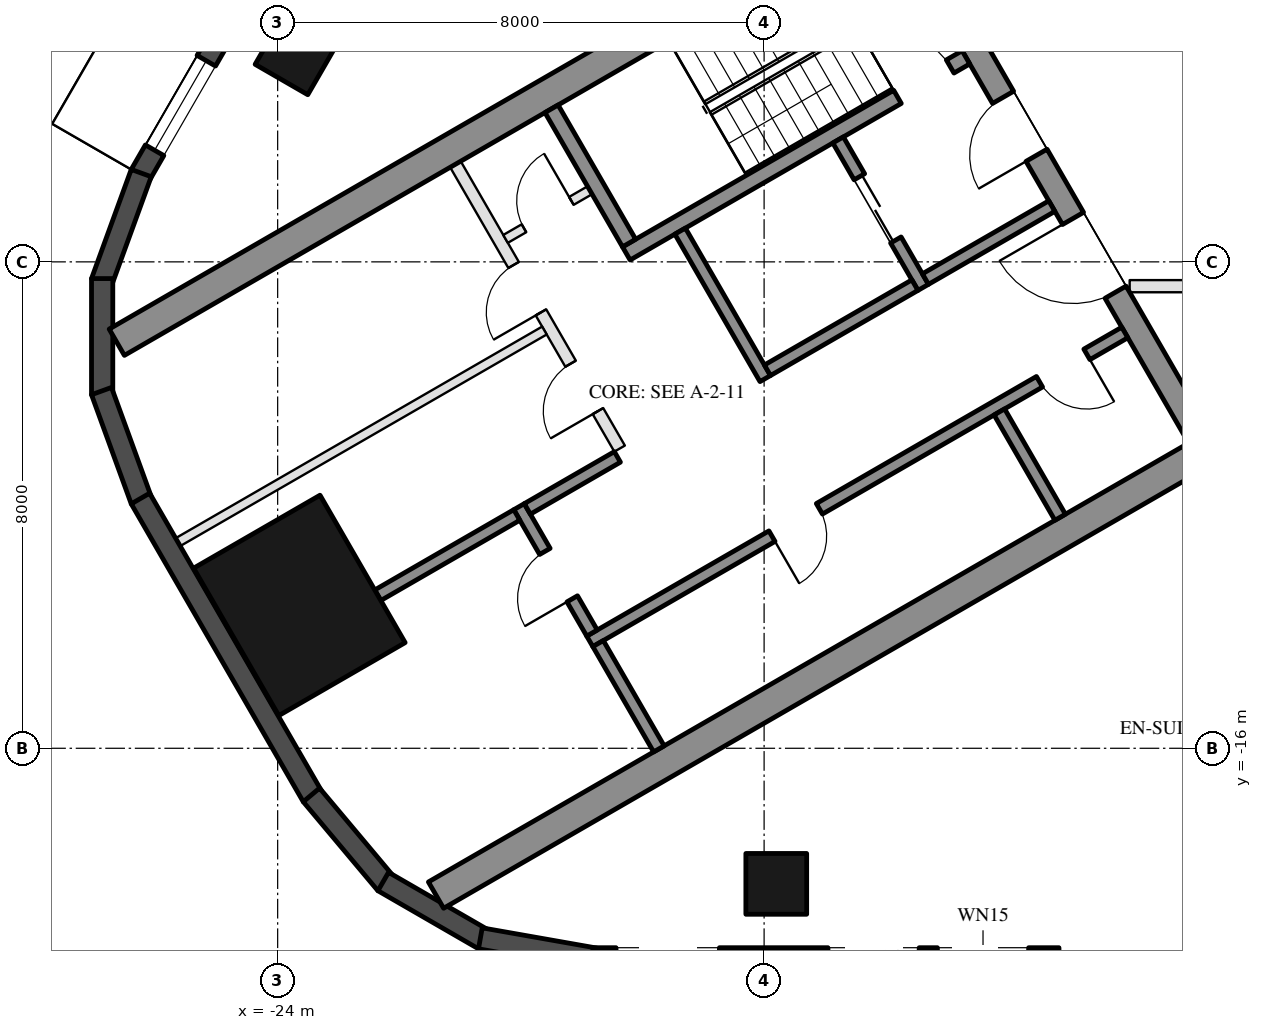
"""IFC4 building model, lengths in metres.
Left out: names, types, materials, properties, quantities, classifications, styles, units other than length and angle.
Written with IfcOpenShell. Run it as: python <this file> out.ifc"""

import sys

from ifc_helpers import new_model, si_unit, direction, frame, frame_2d, origin, origin_2d, place, context, subcontext, project, spatial, rectangle, hollow_rectangle, extrude, element, fill, save


model = new_model("IFC4")
c1 = context("Model", 3, precision=1e-05, world=origin(), true_north=direction((0.0, 1.0)))
c2 = subcontext(c1, "Body", "Model", "MODEL_VIEW")
j1 = project(units=[si_unit("LENGTHUNIT", "METRE"), si_unit("PLANEANGLEUNIT", "RADIAN")], contexts=[c1])
p1 = place(None, origin())
s1 = spatial("IfcSite", under=j1, at=p1, CompositionType="ELEMENT")
p2 = place(p1, origin())
s2 = spatial("IfcBuilding", under=s1, at=p2, CompositionType="ELEMENT")
p3 = place(p2, frame((0.0, 0.0, 53.9)))
s3 = spatial("IfcBuildingStorey", under=s2, at=p3, CompositionType="ELEMENT", Elevation=53.9)
for number, where, z_axis, x_axis in (
    (1, (-15.8, -18.23, 0.0), (0.0, 0.0, 1.0), (-1.0, 0.0, 0.0)),
    (2, (-23.688, -4.568, 0.0), (0.0, 0.0, 1.0), (0.5, 0.866, 0.0)),
):
    element("IfcColumn", number, at=place(p3, frame(where, z_axis=z_axis, x_axis=x_axis)), inside=s3, PredefinedType="COLUMN", context=c2, shape_type="SweptSolid", body=[
        extrude(hollow_rectangle(XDim=1.0, YDim=1.0, WallThickness=0.045, at=origin_2d()), origin(), (0.0, 0.0, 1.0), 3.7),
    ])
p4 = place(p3, frame((-23.643, -13.65, 0.0), z_axis=(0.0, 0.0, 1.0), x_axis=(-0.5, 0.866025403784, 0.0)))
e3 = element("IfcColumn", 3, at=p4, inside=s3, PredefinedType="COLUMN", context=c2, shape_type="SweptSolid", body=[
    extrude(hollow_rectangle(XDim=2.8, YDim=2.4, WallThickness=0.07, at=origin_2d()), origin(), (0.0, 0.0, 1.0), 3.7),
])
p5 = place(p3, frame((-24.299, -3.176, 0.0), z_axis=(0.0, 0.0, 1.0), x_axis=(-0.500028278809, -0.866009076391, 0.0)))
e4 = element("IfcWall", 4, at=p5, inside=s3, PredefinedType="SOLIDWALL", context=c2, shape_type="SweptSolid", body=[
    extrude(rectangle(XDim=3.916, YDim=0.35, at=frame_2d((1.958, 0.0))), origin(), (0.0, 0.0, 1.0), 3.55),
])
p6 = place(p5, frame((1.75, 0.0, 0.3)))
e5 = element("IfcOpeningElement", 5, at=p6, cuts=e4, PredefinedType="OPENING", context=c2, shape_type="SweptSolid", body=[
    extrude(rectangle(XDim=1.7, YDim=2.65, at=frame_2d((0.85, 1.325))), frame((0.0, 0.185, 0.0), z_axis=(0.0, -1.0, 0.0), x_axis=(1.0, 0.0, 0.0)), (0.0, 0.0, 1.0), 0.37),
])
for number, where, z_axis, x_axis in (
    (6, (-26.244, -6.54, 0.0), (0.0, 0.0, 1.0), (-0.342, -0.94, 0.0)),
    (7, (-26.886, -8.275, 0.0), (0.0, 0.0, 1.0), (0.0, -1.0, 0.0)),
    (8, (-26.897, -10.125, 0.0), (0.0, 0.0, 1.0), (0.342, -0.94, 0.0)),
):
    element("IfcWall", number, at=place(p3, frame(where, z_axis=z_axis, x_axis=x_axis)), inside=s3, PredefinedType="SOLIDWALL", context=c2, shape_type="SweptSolid", body=[
        extrude(rectangle(XDim=1.91, YDim=0.35, at=frame_2d((0.955, 0.0))), origin(), (0.0, 0.0, 1.0), 3.55),
    ])
p7 = place(p3, frame((-26.257, -11.893, 0.0), z_axis=(0.0, 0.0, 1.0), x_axis=(0.500018773155, -0.866014564827, 0.0)))
e9 = element("IfcWall", 9, at=p7, inside=s3, PredefinedType="SOLIDWALL", context=c2, shape_type="SweptSolid", body=[
    extrude(rectangle(XDim=5.658, YDim=0.35, at=frame_2d((2.829, 0.0))), origin(), (0.0, 0.0, 1.0), 3.55),
])
for number, where, z_axis, x_axis in (
    (10, (-23.445, -16.768, 0.0), (0.0, 0.0, 1.0), (0.643, -0.766, 0.0)),
    (11, (-22.264, -18.192, 0.0), (0.0, 0.0, 1.0), (0.866, -0.5, 0.0)),
):
    element("IfcWall", number, at=place(p3, frame(where, z_axis=z_axis, x_axis=x_axis)), inside=s3, PredefinedType="SOLIDWALL", context=c2, shape_type="SweptSolid", body=[
        extrude(rectangle(XDim=1.91, YDim=0.35, at=frame_2d((0.955, 0.0))), origin(), (0.0, 0.0, 1.0), 3.55),
    ])
p8 = place(p3, frame((-20.667, -19.126, 0.0), z_axis=(0.0, 0.0, 1.0), x_axis=(0.984798995425, -0.173697837091, 0.0)))
e12 = element("IfcWall", 12, at=p8, inside=s3, PredefinedType="SOLIDWALL", context=c2, shape_type="SweptSolid", body=[
    extrude(rectangle(XDim=1.91, YDim=0.35, at=frame_2d((0.955, 0.0))), origin(), (0.0, 0.0, 1.0), 3.55),
])
p9 = place(p3, frame((-18.816, -19.455, 0.0), z_axis=(0.0, 0.0, 1.0), x_axis=(1.0, 0.0, 0.0)))
e13 = element("IfcWall", 13, at=p9, inside=s3, PredefinedType="SOLIDWALL", context=c2, shape_type="SweptSolid", body=[
    extrude(rectangle(XDim=11.816, YDim=0.35, at=frame_2d((5.908, 0.0))), origin(), (0.0, 0.0, 1.0), 3.55),
])
p10 = place(p9, frame((0.381, 0.0, 0.3)))
e14 = element("IfcOpeningElement", 14, at=p10, cuts=e13, PredefinedType="OPENING", context=c2, shape_type="SweptSolid", body=[
    extrude(rectangle(XDim=1.7, YDim=2.65, at=frame_2d((0.85, 1.325))), frame((0.0, 0.185, 0.0), z_axis=(0.0, -1.0, 0.0), x_axis=(1.0, 0.0, 0.0)), (0.0, 0.0, 1.0), 0.37),
])
p11 = place(p9, frame((7.665, 0.0, 0.0)))
e15 = element("IfcOpeningElement", 15, at=p11, cuts=e13, PredefinedType="OPENING", context=c2, shape_type="SweptSolid", body=[
    extrude(rectangle(XDim=2.4, YDim=2.4, at=frame_2d((1.2, 1.2))), frame((0.0, 0.185, 0.0), z_axis=(0.0, -1.0, 0.0), x_axis=(1.0, 0.0, 0.0)), (0.0, 0.0, 1.0), 0.37),
])
p12 = place(p9, frame((3.866, 0.0, 0.3)))
e16 = element("IfcOpeningElement", 16, at=p12, cuts=e13, PredefinedType="OPENING", context=c2, shape_type="SweptSolid", body=[
    extrude(rectangle(XDim=1.5, YDim=2.65, at=frame_2d((0.75, 1.325))), frame((0.0, 0.185, 0.0), z_axis=(0.0, -1.0, 0.0), x_axis=(1.0, 0.0, 0.0)), (0.0, 0.0, 1.0), 0.37),
])
p13 = place(p9, frame((5.666, 0.0, 0.3)))
e17 = element("IfcOpeningElement", 17, at=p13, cuts=e13, PredefinedType="OPENING", context=c2, shape_type="SweptSolid", body=[
    extrude(rectangle(XDim=1.5, YDim=2.65, at=frame_2d((0.75, 1.325))), frame((0.0, 0.185, 0.0), z_axis=(0.0, -1.0, 0.0), x_axis=(1.0, 0.0, 0.0)), (0.0, 0.0, 1.0), 0.37),
])
for number, where, z_axis, x_axis in (
    (18, (-13.797, -1.903, 0.0), (0.0, 0.0, 1.0), (-0.866, -0.5, 0.0)),
    (19, (-8.547, -10.997, 0.0), (0.0, 0.0, 1.0), (-0.866, -0.5, 0.0)),
):
    element("IfcWall", number, at=place(p3, frame(where, z_axis=z_axis, x_axis=x_axis)), inside=s3, PredefinedType="SHEAR", context=c2, shape_type="SweptSolid", body=[
        extrude(rectangle(XDim=14.837, YDim=0.5, at=frame_2d((7.418, 0.0))), origin(), (0.0, 0.0, 1.0), 3.5),
    ])
p14 = place(p3, frame((-13.845, -2.22, 0.0), z_axis=(0.0, 0.0, 1.0), x_axis=(0.500004234368, -0.866022959057, 0.0)))
e20 = element("IfcWall", 20, at=p14, inside=s3, PredefinedType="SHEAR", context=c2, shape_type="SweptSolid", body=[
    extrude(rectangle(XDim=10.0, YDim=0.4, at=frame_2d((5.0, 0.0))), origin(), (0.0, 0.0, 1.0), 3.5),
])
p15 = place(p14, frame((3.55, 0.0, 0.0)))
e21 = element("IfcOpeningElement", 21, at=p15, cuts=e20, PredefinedType="OPENING", context=c2, shape_type="SweptSolid", body=[
    extrude(rectangle(XDim=1.1, YDim=2.1, at=frame_2d((0.55, 1.05))), frame((0.0, 0.21, 0.0), z_axis=(0.0, -1.0, 0.0), x_axis=(1.0, 0.0, 0.0)), (0.0, 0.0, 1.0), 0.42),
])
p16 = place(p14, frame((5.85, 0.0, 0.0)))
e22 = element("IfcOpeningElement", 22, at=p16, cuts=e20, PredefinedType="OPENING", context=c2, shape_type="SweptSolid", body=[
    extrude(rectangle(XDim=1.4, YDim=2.1, at=frame_2d((0.7, 1.05))), frame((0.0, 0.21, 0.0), z_axis=(0.0, -1.0, 0.0), x_axis=(1.0, 0.0, 0.0)), (0.0, 0.0, 1.0), 0.42),
])
p17 = place(p3, frame((-12.681, -4.636, 0.0), z_axis=(0.0, 0.0, 1.0), x_axis=(-0.866021702275, -0.500006411147, 0.0)))
e23 = element("IfcWall", 23, at=p17, inside=s3, PredefinedType="SHEAR", context=c2, shape_type="SweptSolid", body=[
    extrude(rectangle(XDim=6.45, YDim=0.25, at=frame_2d((3.225, 0.0))), origin(), (0.0, 0.0, 1.0), 3.5),
])
p18 = place(p17, frame((0.3, 0.0, 0.0)))
e24 = element("IfcOpeningElement", 24, at=p18, cuts=e23, PredefinedType="OPENING", context=c2, shape_type="SweptSolid", body=[
    extrude(rectangle(XDim=1.0, YDim=2.1, at=frame_2d((0.5, 1.05))), frame((0.0, 0.135, 0.0), z_axis=(0.0, -1.0, 0.0), x_axis=(1.0, 0.0, 0.0)), (0.0, 0.0, 1.0), 0.27),
])
p19 = place(p3, frame((-19.496, -5.482, 0.0), z_axis=(0.0, 0.0, 1.0), x_axis=(0.499990435942, -0.866030925526, 0.0)))
e25 = element("IfcWall", 25, at=p19, inside=s3, PredefinedType="SHEAR", context=c2, shape_type="SweptSolid", body=[
    extrude(rectangle(XDim=2.55, YDim=0.25, at=frame_2d((1.275, 0.0))), origin(), (0.0, 0.0, 1.0), 3.5),
])
p20 = place(p3, frame((-17.381, -7.495, 0.0), z_axis=(0.0, 0.0, 1.0), x_axis=(0.500011755427, -0.866018616679, 0.0)))
e26 = element("IfcWall", 26, at=p20, inside=s3, PredefinedType="SHEAR", context=c2, shape_type="SweptSolid", body=[
    extrude(rectangle(XDim=2.8, YDim=0.2, at=frame_2d((1.4, 0.0))), origin(), (0.0, 0.0, 1.0), 3.5),
])
p21 = place(p3, frame((-14.783, -5.995, 0.0), z_axis=(0.0, 0.0, 1.0), x_axis=(0.49994636267, -0.866056369097, 0.0)))
e27 = element("IfcWall", 27, at=p21, inside=s3, PredefinedType="SHEAR", context=c2, shape_type="SweptSolid", body=[
    extrude(rectangle(XDim=2.8, YDim=0.2, at=frame_2d((1.4, 0.0))), origin(), (0.0, 0.0, 1.0), 3.5),
])
p22 = place(p21, frame((0.7, 0.0, 0.0)))
e28 = element("IfcOpeningElement", 28, at=p22, cuts=e27, PredefinedType="OPENING", context=c2, shape_type="SweptSolid", body=[
    extrude(rectangle(XDim=1.2, YDim=2.1, at=frame_2d((0.6, 1.05))), frame((0.0, 0.11, 0.0), z_axis=(0.0, -1.0, 0.0), x_axis=(1.0, 0.0, 0.0)), (0.0, 0.0, 1.0), 0.22),
])
p23 = place(p3, frame((-13.52, -8.383, 0.0), z_axis=(0.0, 0.0, 1.0), x_axis=(-0.866034573852, -0.49998411664, 0.0)))
e29 = element("IfcWall", 29, at=p23, inside=s3, PredefinedType="SHEAR", context=c2, shape_type="SweptSolid", body=[
    extrude(rectangle(XDim=2.8, YDim=0.2, at=frame_2d((1.4, 0.0))), origin(), (0.0, 0.0, 1.0), 3.5),
])
p24 = place(p3, frame((-11.268, -7.083, 0.0), z_axis=(0.0, 0.0, 1.0), x_axis=(-0.866050077142, -0.499957262057, 0.0)))
e30 = element("IfcWall", 30, at=p24, inside=s3, PredefinedType="SHEAR", context=c2, shape_type="SweptSolid", body=[
    extrude(rectangle(XDim=2.4, YDim=0.2, at=frame_2d((1.2, 0.0))), origin(), (0.0, 0.0, 1.0), 3.5),
])
p25 = place(p3, frame((-10.068, -9.162, 0.0), z_axis=(0.0, 0.0, 1.0), x_axis=(-0.866032725843, -0.499987317609, 0.0)))
e31 = element("IfcWall", 31, at=p25, inside=s3, PredefinedType="SHEAR", context=c2, shape_type="SweptSolid", body=[
    extrude(rectangle(XDim=10.16, YDim=0.2, at=frame_2d((5.08, 0.0))), origin(), (0.0, 0.0, 1.0), 3.5),
])
p26 = place(p25, frame((0.72, 0.0, 0.0)))
e32 = element("IfcOpeningElement", 32, at=p26, cuts=e31, PredefinedType="OPENING", context=c2, shape_type="SweptSolid", body=[
    extrude(rectangle(XDim=0.9, YDim=2.1, at=frame_2d((0.45, 1.05))), frame((0.0, 0.11, 0.0), z_axis=(0.0, -1.0, 0.0), x_axis=(1.0, 0.0, 0.0)), (0.0, 0.0, 1.0), 0.22),
])
p27 = place(p25, frame((5.8, 0.0, 0.0)))
e33 = element("IfcOpeningElement", 33, at=p27, cuts=e31, PredefinedType="OPENING", context=c2, shape_type="SweptSolid", body=[
    extrude(rectangle(XDim=0.9, YDim=2.1, at=frame_2d((0.45, 1.05))), frame((0.0, 0.11, 0.0), z_axis=(0.0, -1.0, 0.0), x_axis=(1.0, 0.0, 0.0)), (0.0, 0.0, 1.0), 0.22),
])
p28 = place(p3, frame((-20.031, -12.026, 0.0), z_axis=(0.0, 0.0, 1.0), x_axis=(0.500033551112, -0.866006032174, 0.0)))
e34 = element("IfcWall", 34, at=p28, inside=s3, PredefinedType="SHEAR", context=c2, shape_type="SweptSolid", body=[
    extrude(rectangle(XDim=2.4, YDim=0.2, at=frame_2d((1.2, 0.0))), origin(), (0.0, 0.0, 1.0), 3.5),
])
p29 = place(p28, frame((0.85, 0.0, 0.0)))
e35 = element("IfcOpeningElement", 35, at=p29, cuts=e34, PredefinedType="OPENING", context=c2, shape_type="SweptSolid", body=[
    extrude(rectangle(XDim=0.9, YDim=2.1, at=frame_2d((0.45, 1.05))), frame((0.0, 0.11, 0.0), z_axis=(0.0, -1.0, 0.0), x_axis=(1.0, 0.0, 0.0)), (0.0, 0.0, 1.0), 0.22),
])
p30 = place(p3, frame((-18.413, -11.208, 0.0), z_axis=(0.0, 0.0, 1.0), x_axis=(-0.866038183914, -0.499977863513, 0.0)))
e36 = element("IfcWall", 36, at=p30, inside=s3, PredefinedType="SHEAR", context=c2, shape_type="SweptSolid", body=[
    extrude(rectangle(XDim=1.71, YDim=0.2, at=frame_2d((0.855, 0.0))), origin(), (0.0, 0.0, 1.0), 3.5),
])
for number, where, z_axis, x_axis in (
    (37, (-12.131, -10.468, 0.0), (0.0, 0.0, 1.0), (0.5, -0.866, 0.0)),
    (38, (-18.73, -14.278, 0.0), (0.0, 0.0, 1.0), (0.5, -0.866, 0.0)),
):
    element("IfcWall", number, at=place(p3, frame(where, z_axis=z_axis, x_axis=x_axis)), inside=s3, PredefinedType="SHEAR", context=c2, shape_type="SweptSolid", body=[
        extrude(rectangle(XDim=2.0, YDim=0.2, at=frame_2d((1.0, 0.0))), origin(), (0.0, 0.0, 1.0), 3.5),
    ])
p31 = place(p3, frame((-20.067, -12.163, 0.0), z_axis=(0.0, 0.0, 1.0), x_axis=(-0.866060851709, -0.499938597367, 0.0)))
e39 = element("IfcWall", 39, at=p31, inside=s3, PredefinedType="SHEAR", context=c2, shape_type="SweptSolid", body=[
    extrude(rectangle(XDim=2.64, YDim=0.2, at=frame_2d((1.32, 0.0))), origin(), (0.0, 0.0, 1.0), 3.5),
])
p32 = place(p3, frame((-21.076, -6.395, 0.0), z_axis=(0.0, 0.0, 1.0), x_axis=(0.50001468107, -0.866016927499, 0.0)))
e40 = element("IfcWall", 40, at=p32, inside=s3, PredefinedType="PARTITIONING", context=c2, shape_type="SweptSolid", body=[
    extrude(rectangle(XDim=5.4, YDim=0.2, at=frame_2d((2.7, 0.0))), origin(), (0.0, 0.0, 1.0), 3.5),
])
p33 = place(p32, frame((1.913, 0.0, 0.0)))
e41 = element("IfcOpeningElement", 41, at=p33, cuts=e40, PredefinedType="OPENING", context=c2, shape_type="SweptSolid", body=[
    extrude(rectangle(XDim=0.9, YDim=2.1, at=frame_2d((0.45, 1.05))), frame((0.0, 0.11, 0.0), z_axis=(0.0, -1.0, 0.0), x_axis=(1.0, 0.0, 0.0)), (0.0, 0.0, 1.0), 0.22),
])
p34 = place(p32, frame((3.788, 0.0, 0.0)))
e42 = element("IfcOpeningElement", 42, at=p34, cuts=e40, PredefinedType="OPENING", context=c2, shape_type="SweptSolid", body=[
    extrude(rectangle(XDim=0.9, YDim=2.1, at=frame_2d((0.45, 1.05))), frame((0.0, 0.11, 0.0), z_axis=(0.0, -1.0, 0.0), x_axis=(1.0, 0.0, 0.0)), (0.0, 0.0, 1.0), 0.22),
])
p35 = place(p3, frame((-18.866, -6.822, 0.0), z_axis=(0.0, 0.0, 1.0), x_axis=(-0.866028054938, -0.499995408039, 0.0)))
e43 = element("IfcWall", 43, at=p35, inside=s3, PredefinedType="PARTITIONING", context=c2, shape_type="SweptSolid", body=[
    extrude(rectangle(XDim=1.6, YDim=0.15, at=frame_2d((0.8, 0.0))), origin(), (0.0, 0.0, 1.0), 3.5),
])
p36 = place(p35, frame((0.35, 0.0, 0.0)))
e44 = element("IfcOpeningElement", 44, at=p36, cuts=e43, PredefinedType="OPENING", context=c2, shape_type="SweptSolid", body=[
    extrude(rectangle(XDim=0.9, YDim=2.1, at=frame_2d((0.45, 1.05))), frame((0.0, 0.085, 0.0), z_axis=(0.0, -1.0, 0.0), x_axis=(1.0, 0.0, 0.0)), (0.0, 0.0, 1.0), 0.17),
])
p37 = place(p3, frame((-19.613, -9.13, 0.0), z_axis=(0.0, 0.0, 1.0), x_axis=(-0.866031734426, -0.499989034847, 0.0)))
e45 = element("IfcWall", 45, at=p37, inside=s3, PredefinedType="PARTITIONING", context=c2, shape_type="SweptSolid", body=[
    extrude(rectangle(XDim=6.95, YDim=0.15, at=frame_2d((3.475, 0.0))), origin(), (0.0, 0.0, 1.0), 3.5),
])
p38 = place(p3, frame((-5.9, -8.4, 0.0), z_axis=(0.0, 0.0, 1.0), x_axis=(-1.0, 0.0, 0.0)))
e46 = element("IfcWall", 46, at=p38, inside=s3, PredefinedType="PARTITIONING", context=c2, shape_type="SweptSolid", body=[
    extrude(rectangle(XDim=4.088, YDim=0.2, at=frame_2d((2.044, 0.0))), origin(), (0.0, 0.0, 1.0), 2.95),
])
p39 = place(p38, frame((1.544, 0.0, 0.0)))
e47 = element("IfcOpeningElement", 47, at=p39, cuts=e46, PredefinedType="OPENING", context=c2, shape_type="SweptSolid", body=[
    extrude(rectangle(XDim=1.0, YDim=2.1, at=frame_2d((0.5, 1.05))), frame((0.0, 0.11, 0.0), z_axis=(0.0, -1.0, 0.0), x_axis=(1.0, 0.0, 0.0)), (0.0, 0.0, 1.0), 0.22),
])
p40 = place(p6, origin())
e48 = element("IfcWindow", 48, at=p40, inside=s3, PartitioningType="SINGLE_PANEL", PredefinedType="WINDOW", context=c2, shape_type="SweptSolid", body=[
    extrude(rectangle(XDim=1.7, YDim=2.65, at=frame_2d((0.85, 1.325))), frame((0.0, 0.03, 0.0), z_axis=(0.0, -1.0, 0.0), x_axis=(1.0, 0.0, 0.0)), (0.0, 0.0, 1.0), 0.06),
])
fill(e5, e48)
p41 = place(p22, origin())
e49 = element("IfcDoor", 49, at=p41, inside=s3, OperationType="DOUBLE_DOOR_SLIDING", PredefinedType="DOOR", context=c2, shape_type="SweptSolid", body=[
    extrude(rectangle(XDim=1.2, YDim=2.1, at=frame_2d((0.6, 1.05))), frame((0.0, 0.025, 0.0), z_axis=(0.0, -1.0, 0.0), x_axis=(1.0, 0.0, 0.0)), (0.0, 0.0, 1.0), 0.05),
])
fill(e28, e49)
p42 = place(p36, frame((0.9, 0.0, 0.0), z_axis=(0.0, 0.0, 1.0), x_axis=(-1.0, 0.0, 0.0)))
e50 = element("IfcDoor", 50, at=p42, inside=s3, OperationType="SINGLE_SWING_RIGHT", PredefinedType="DOOR", context=c2, shape_type="SweptSolid", body=[
    extrude(rectangle(XDim=0.9, YDim=2.1, at=frame_2d((0.45, 1.05))), frame((0.0, 0.025, 0.0), z_axis=(0.0, -1.0, 0.0), x_axis=(1.0, 0.0, 0.0)), (0.0, 0.0, 1.0), 0.05),
])
fill(e44, e50)
p43 = place(p26, origin())
e51 = element("IfcDoor", 51, at=p43, inside=s3, OperationType="SINGLE_SWING_LEFT", PredefinedType="DOOR", context=c2, shape_type="SweptSolid", body=[
    extrude(rectangle(XDim=0.9, YDim=2.1, at=frame_2d((0.45, 1.05))), frame((0.0, 0.025, 0.0), z_axis=(0.0, -1.0, 0.0), x_axis=(1.0, 0.0, 0.0)), (0.0, 0.0, 1.0), 0.05),
])
fill(e32, e51)
p44 = place(p27, origin())
e52 = element("IfcDoor", 52, at=p44, inside=s3, OperationType="SINGLE_SWING_RIGHT", PredefinedType="DOOR", context=c2, shape_type="SweptSolid", body=[
    extrude(rectangle(XDim=0.9, YDim=2.1, at=frame_2d((0.45, 1.05))), frame((0.0, 0.025, 0.0), z_axis=(0.0, -1.0, 0.0), x_axis=(1.0, 0.0, 0.0)), (0.0, 0.0, 1.0), 0.05),
])
fill(e33, e52)
p45 = place(p29, frame((0.9, 0.0, 0.0), z_axis=(0.0, 0.0, 1.0), x_axis=(-1.0, 0.0, 0.0)))
e53 = element("IfcDoor", 53, at=p45, inside=s3, OperationType="SINGLE_SWING_LEFT", PredefinedType="DOOR", context=c2, shape_type="SweptSolid", body=[
    extrude(rectangle(XDim=0.9, YDim=2.1, at=frame_2d((0.45, 1.05))), frame((0.0, 0.025, 0.0), z_axis=(0.0, -1.0, 0.0), x_axis=(1.0, 0.0, 0.0)), (0.0, 0.0, 1.0), 0.05),
])
fill(e35, e53)
p46 = place(p33, frame((0.9, 0.0, 0.0), z_axis=(0.0, 0.0, 1.0), x_axis=(-1.0, 0.0, 0.0)))
e54 = element("IfcDoor", 54, at=p46, inside=s3, OperationType="SINGLE_SWING_LEFT", PredefinedType="DOOR", context=c2, shape_type="SweptSolid", body=[
    extrude(rectangle(XDim=0.9, YDim=2.1, at=frame_2d((0.45, 1.05))), frame((0.0, 0.025, 0.0), z_axis=(0.0, -1.0, 0.0), x_axis=(1.0, 0.0, 0.0)), (0.0, 0.0, 1.0), 0.05),
])
fill(e41, e54)
p47 = place(p34, frame((0.9, 0.0, 0.0), z_axis=(0.0, 0.0, 1.0), x_axis=(-1.0, 0.0, 0.0)))
e55 = element("IfcDoor", 55, at=p47, inside=s3, OperationType="SINGLE_SWING_LEFT", PredefinedType="DOOR", context=c2, shape_type="SweptSolid", body=[
    extrude(rectangle(XDim=0.9, YDim=2.1, at=frame_2d((0.45, 1.05))), frame((0.0, 0.025, 0.0), z_axis=(0.0, -1.0, 0.0), x_axis=(1.0, 0.0, 0.0)), (0.0, 0.0, 1.0), 0.05),
])
fill(e42, e55)
p48 = place(p15, frame((1.1, 0.0, 0.0), z_axis=(0.0, 0.0, 1.0), x_axis=(-1.0, 0.0, 0.0)))
e56 = element("IfcDoor", 56, at=p48, inside=s3, OperationType="SINGLE_SWING_LEFT", PredefinedType="DOOR", context=c2, shape_type="SweptSolid", body=[
    extrude(rectangle(XDim=1.1, YDim=2.1, at=frame_2d((0.55, 1.05))), frame((0.0, 0.025, 0.0), z_axis=(0.0, -1.0, 0.0), x_axis=(1.0, 0.0, 0.0)), (0.0, 0.0, 1.0), 0.05),
])
fill(e21, e56)
p49 = place(p16, frame((1.4, 0.0, 0.0), z_axis=(0.0, 0.0, 1.0), x_axis=(-1.0, 0.0, 0.0)))
e57 = element("IfcDoor", 57, at=p49, inside=s3, OperationType="DOUBLE_DOOR_SINGLE_SWING", PredefinedType="DOOR", context=c2, shape_type="SweptSolid", body=[
    extrude(rectangle(XDim=1.4, YDim=2.1, at=frame_2d((0.7, 1.05))), frame((0.0, 0.025, 0.0), z_axis=(0.0, -1.0, 0.0), x_axis=(1.0, 0.0, 0.0)), (0.0, 0.0, 1.0), 0.05),
])
fill(e22, e57)
p50 = place(p18, frame((1.0, 0.0, 0.0), z_axis=(0.0, 0.0, 1.0), x_axis=(-1.0, 0.0, 0.0)))
e58 = element("IfcDoor", 58, at=p50, inside=s3, OperationType="SINGLE_SWING_LEFT", PredefinedType="DOOR", context=c2, shape_type="SweptSolid", body=[
    extrude(rectangle(XDim=1.0, YDim=2.1, at=frame_2d((0.5, 1.05))), frame((0.0, 0.025, 0.0), z_axis=(0.0, -1.0, 0.0), x_axis=(1.0, 0.0, 0.0)), (0.0, 0.0, 1.0), 0.05),
])
fill(e24, e58)
save(model, sys.argv[1])
